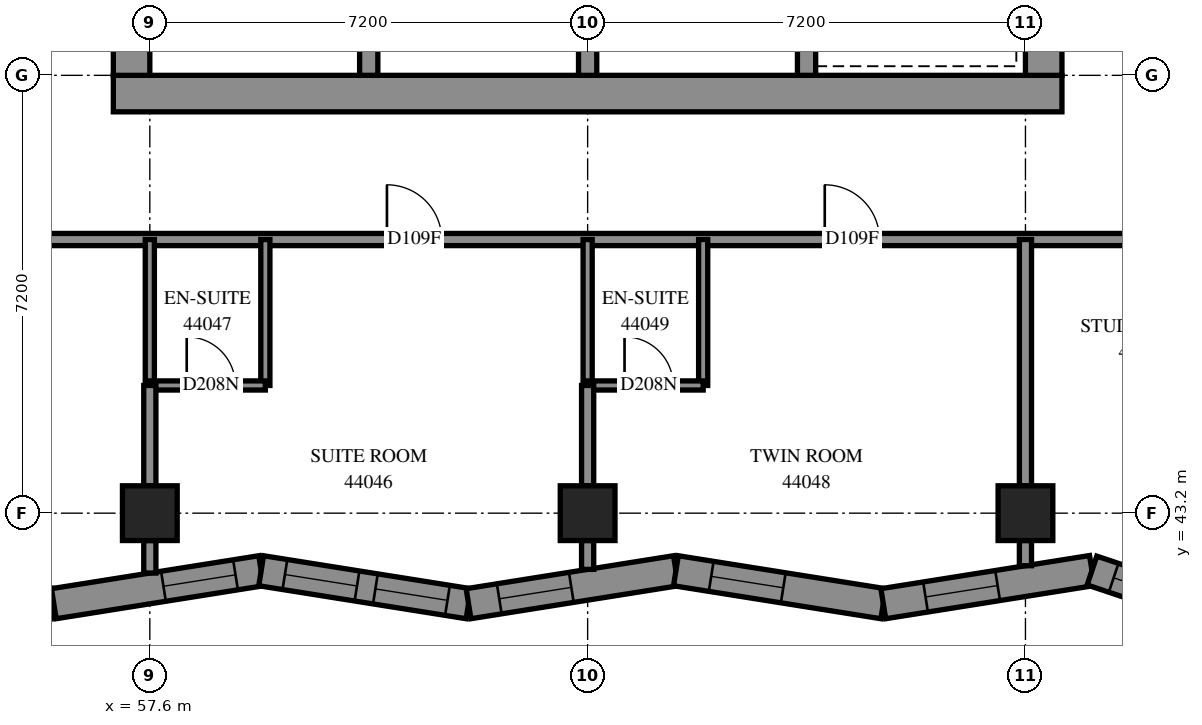
"""IFC4 building model, lengths in metres.
Left out: names, types, materials, properties, quantities, classifications, styles, units other than length and angle.
Written with IfcOpenShell. Run it as: python <this file> out.ifc"""

import sys

from ifc_helpers import new_model, si_unit, direction, frame, frame_2d, origin, origin_2d, place, context, subcontext, project, spatial, polyline, rectangle, outline, extrude, element, fill, save


model = new_model("IFC4")
c1 = context("Model", 3, precision=1e-05, world=origin(), true_north=direction((0.0, 1.0)))
c2 = subcontext(c1, "Body", "Model", "MODEL_VIEW")
j1 = project(units=[si_unit("LENGTHUNIT", "METRE"), si_unit("PLANEANGLEUNIT", "RADIAN")], contexts=[c1])
p1 = place(None, origin())
s1 = spatial("IfcSite", under=j1, at=p1, CompositionType="ELEMENT")
p2 = place(p1, origin())
s2 = spatial("IfcBuilding", under=s1, at=p2, CompositionType="ELEMENT")
p3 = place(p2, frame((0.0, 0.0, 162.6)))
s3 = spatial("IfcBuildingStorey", under=s2, at=p3, CompositionType="ELEMENT", Elevation=162.6)
for number, where, z_axis, x_axis in (
    (1, (57.6, 43.2, 0.0), (0.0, 0.0, 1.0), (1.0, 0.0, 0.0)),
    (2, (64.8, 43.2, 0.0), (0.0, 0.0, 1.0), (1.0, 0.0, 0.0)),
    (3, (72.0, 43.2, 0.0), (0.0, 0.0, 1.0), (1.0, 0.0, 0.0)),
):
    element("IfcColumn", number, at=place(p3, frame(where, z_axis=z_axis, x_axis=x_axis)), inside=s3, PredefinedType="COLUMN", context=c2, shape_type="SweptSolid", body=[
        extrude(rectangle(XDim=0.9, YDim=0.9, at=origin_2d()), origin(), (0.0, 0.0, 1.0), 3.1),
    ])
p4 = place(p3, frame((57.0, 50.1, -0.3), z_axis=(0.0, 0.0, 1.0), x_axis=(1.0, 0.0, 0.0)))
e4 = element("IfcWall", 4, at=p4, inside=s3, PredefinedType="SHEAR", context=c2, shape_type="SweptSolid", body=[
    extrude(rectangle(XDim=15.6, YDim=0.6, at=frame_2d((7.8, 0.0))), origin(), (0.0, 0.0, 1.0), 2.7),
])
p5 = place(p3, frame((57.3, 50.4, -0.3), z_axis=(0.0, 0.0, 1.0), x_axis=(0.0, 1.0, 0.0)))
e5 = element("IfcWall", 5, at=p5, inside=s3, PredefinedType="SHEAR", context=c2, shape_type="SweptSolid", body=[
    extrude(rectangle(XDim=14.4, YDim=0.6, at=frame_2d((7.2, 0.0))), origin(), (0.0, 0.0, 1.0), 2.7),
])
p6 = place(p5, frame((4.55, 0.0, 0.3)))
e6 = element("IfcOpeningElement", 6, at=p6, cuts=e5, PredefinedType="OPENING", context=c2, shape_type="SweptSolid", body=[
    extrude(rectangle(XDim=1.1, YDim=2.1, at=frame_2d((0.55, 1.05))), frame((0.0, 0.31, 0.0), z_axis=(0.0, -1.0, 0.0), x_axis=(1.0, 0.0, 0.0)), (0.0, 0.0, 1.0), 0.62),
])
p7 = place(p5, frame((11.35, 0.0, 0.3)))
e7 = element("IfcOpeningElement", 7, at=p7, cuts=e5, PredefinedType="OPENING", context=c2, shape_type="SweptSolid", body=[
    extrude(rectangle(XDim=1.1, YDim=2.1, at=frame_2d((0.55, 1.05))), frame((0.0, 0.31, 0.0), z_axis=(0.0, -1.0, 0.0), x_axis=(1.0, 0.0, 0.0)), (0.0, 0.0, 1.0), 0.62),
])
p8 = place(p3, frame((72.3, 50.4, -0.3), z_axis=(0.0, 0.0, 1.0), x_axis=(0.0, 1.0, 0.0)))
e8 = element("IfcWall", 8, at=p8, inside=s3, PredefinedType="SHEAR", context=c2, shape_type="SweptSolid", body=[
    extrude(rectangle(XDim=14.4, YDim=0.6, at=frame_2d((7.2, 0.0))), origin(), (0.0, 0.0, 1.0), 2.7),
])
p9 = place(p8, frame((4.55, 0.0, 0.3)))
e9 = element("IfcOpeningElement", 9, at=p9, cuts=e8, PredefinedType="OPENING", context=c2, shape_type="SweptSolid", body=[
    extrude(rectangle(XDim=1.1, YDim=2.1, at=frame_2d((0.55, 1.05))), frame((0.0, 0.31, 0.0), z_axis=(0.0, -1.0, 0.0), x_axis=(1.0, 0.0, 0.0)), (0.0, 0.0, 1.0), 0.62),
])
p10 = place(p8, frame((11.35, 0.0, 0.3)))
e10 = element("IfcOpeningElement", 10, at=p10, cuts=e8, PredefinedType="OPENING", context=c2, shape_type="SweptSolid", body=[
    extrude(rectangle(XDim=1.1, YDim=2.1, at=frame_2d((0.55, 1.05))), frame((0.0, 0.31, 0.0), z_axis=(0.0, -1.0, 0.0), x_axis=(1.0, 0.0, 0.0)), (0.0, 0.0, 1.0), 0.62),
])
for number, where, z_axis, x_axis in (
    (11, (61.2, 50.4, 0.0), (0.0, 0.0, 1.0), (0.0, 1.0, 0.0)),
    (12, (64.8, 50.4, 0.0), (0.0, 0.0, 1.0), (0.0, 1.0, 0.0)),
    (13, (68.4, 50.4, 0.0), (0.0, 0.0, 1.0), (0.0, 1.0, 0.0)),
):
    element("IfcWall", number, at=place(p3, frame(where, z_axis=z_axis, x_axis=x_axis)), inside=s3, PredefinedType="SOLIDWALL", context=c2, shape_type="SweptSolid", body=[
        extrude(rectangle(XDim=3.3, YDim=0.3, at=frame_2d((1.65, 0.0))), origin(), (0.0, 0.0, 1.0), 3.1),
    ])
p11 = place(p3, frame((52.589, 42.257, 0.0), z_axis=(0.0, 0.0, 1.0), x_axis=(0.9876042465, -0.1569644935, 0.0)))
e14 = element("IfcWall", 14, at=p11, inside=s3, PredefinedType="SOLIDWALL", context=c2, shape_type="SweptSolid", body=[
    extrude(outline(polyline([(0.061, -0.25), (3.514, -0.25), (3.435, 0.25), (-0.061, 0.25), (0.061, -0.25)])), origin(), (0.0, 0.0, 1.0), 3.1),
])
p12 = place(p11, frame((1.732, 0.0, 0.45)))
e15 = element("IfcOpeningElement", 15, at=p12, cuts=e14, PredefinedType="OPENING", context=c2, shape_type="SweptSolid", body=[
    extrude(rectangle(XDim=1.2, YDim=2.5, at=frame_2d((0.6, 1.25))), frame((0.0, 0.26, 0.0), z_axis=(0.0, -1.0, 0.0), x_axis=(1.0, 0.0, 0.0)), (0.0, 0.0, 1.0), 0.52),
])
p13 = place(p3, frame((56.021, 41.711, 0.0), z_axis=(0.0, 0.0, 1.0), x_axis=(0.9876056196, 0.1569558544, 0.0)))
e16 = element("IfcWall", 16, at=p13, inside=s3, PredefinedType="SOLIDWALL", context=c2, shape_type="SweptSolid", body=[
    extrude(outline(polyline([(-0.04, -0.25), (3.413, -0.25), (3.493, 0.25), (0.04, 0.25), (-0.04, -0.25)])), origin(), (0.0, 0.0, 1.0), 3.1),
])
p14 = place(p13, frame((1.826, 0.0, 0.45)))
e17 = element("IfcOpeningElement", 17, at=p14, cuts=e16, PredefinedType="OPENING", context=c2, shape_type="SweptSolid", body=[
    extrude(rectangle(XDim=1.2, YDim=2.5, at=frame_2d((0.6, 1.25))), frame((0.0, 0.26, 0.0), z_axis=(0.0, -1.0, 0.0), x_axis=(1.0, 0.0, 0.0)), (0.0, 0.0, 1.0), 0.52),
])
p15 = place(p3, frame((59.431, 42.253, 0.0), z_axis=(0.0, 0.0, 1.0), x_axis=(0.9876049061, -0.1569603434, 0.0)))
e18 = element("IfcWall", 18, at=p15, inside=s3, PredefinedType="SOLIDWALL", context=c2, shape_type="SweptSolid", body=[
    extrude(outline(polyline([(0.04, -0.25), (3.493, -0.25), (3.413, 0.25), (-0.04, 0.25), (0.04, -0.25)])), origin(), (0.0, 0.0, 1.0), 3.1),
])
p16 = place(p15, frame((0.396, 0.0, 0.45)))
e19 = element("IfcOpeningElement", 19, at=p16, cuts=e18, PredefinedType="OPENING", context=c2, shape_type="SweptSolid", body=[
    extrude(rectangle(XDim=1.2, YDim=2.5, at=frame_2d((0.6, 1.25))), frame((0.0, 0.26, 0.0), z_axis=(0.0, -1.0, 0.0), x_axis=(1.0, 0.0, 0.0)), (0.0, 0.0, 1.0), 0.52),
])
p17 = place(p15, frame((1.902, 0.0, 0.45)))
e20 = element("IfcOpeningElement", 20, at=p17, cuts=e18, PredefinedType="OPENING", context=c2, shape_type="SweptSolid", body=[
    extrude(rectangle(XDim=1.2, YDim=2.5, at=frame_2d((0.6, 1.25))), frame((0.0, 0.26, 0.0), z_axis=(0.0, -1.0, 0.0), x_axis=(1.0, 0.0, 0.0)), (0.0, 0.0, 1.0), 0.52),
])
p18 = place(p3, frame((62.841, 41.711, 0.0), z_axis=(0.0, 0.0, 1.0), x_axis=(0.9876056196, 0.1569558544, 0.0)))
e21 = element("IfcWall", 21, at=p18, inside=s3, PredefinedType="SOLIDWALL", context=c2, shape_type="SweptSolid", body=[
    extrude(outline(polyline([(-0.04, -0.25), (3.413, -0.25), (3.493, 0.25), (0.04, 0.25), (-0.04, -0.25)])), origin(), (0.0, 0.0, 1.0), 3.1),
])
p19 = place(p18, frame((0.511, 0.0, 0.45)))
e22 = element("IfcOpeningElement", 22, at=p19, cuts=e21, PredefinedType="OPENING", context=c2, shape_type="SweptSolid", body=[
    extrude(rectangle(XDim=1.2, YDim=2.5, at=frame_2d((0.6, 1.25))), frame((0.0, 0.26, 0.0), z_axis=(0.0, -1.0, 0.0), x_axis=(1.0, 0.0, 0.0)), (0.0, 0.0, 1.0), 0.52),
])
p20 = place(p3, frame((66.252, 42.253, 0.0), z_axis=(0.0, 0.0, 1.0), x_axis=(0.9876056196, -0.1569558544, 0.0)))
e23 = element("IfcWall", 23, at=p20, inside=s3, PredefinedType="SOLIDWALL", context=c2, shape_type="SweptSolid", body=[
    extrude(outline(polyline([(0.04, -0.25), (3.493, -0.25), (3.413, 0.25), (-0.04, 0.25), (0.04, -0.25)])), origin(), (0.0, 0.0, 1.0), 3.1),
])
p21 = place(p20, frame((0.588, 0.0, 0.45)))
e24 = element("IfcOpeningElement", 24, at=p21, cuts=e23, PredefinedType="OPENING", context=c2, shape_type="SweptSolid", body=[
    extrude(rectangle(XDim=1.2, YDim=2.5, at=frame_2d((0.6, 1.25))), frame((0.0, 0.26, 0.0), z_axis=(0.0, -1.0, 0.0), x_axis=(1.0, 0.0, 0.0)), (0.0, 0.0, 1.0), 0.52),
])
p22 = place(p3, frame((69.662, 41.711, 0.0), z_axis=(0.0, 0.0, 1.0), x_axis=(0.9876042465, 0.1569644935, 0.0)))
e25 = element("IfcWall", 25, at=p22, inside=s3, PredefinedType="SOLIDWALL", context=c2, shape_type="SweptSolid", body=[
    extrude(outline(polyline([(-0.04, -0.25), (3.413, -0.25), (3.536, 0.25), (0.04, 0.25), (-0.04, -0.25)])), origin(), (0.0, 0.0, 1.0), 3.1),
])
p23 = place(p22, frame((0.704, 0.0, 0.45)))
e26 = element("IfcOpeningElement", 26, at=p23, cuts=e25, PredefinedType="OPENING", context=c2, shape_type="SweptSolid", body=[
    extrude(rectangle(XDim=1.2, YDim=2.5, at=frame_2d((0.6, 1.25))), frame((0.0, 0.26, 0.0), z_axis=(0.0, -1.0, 0.0), x_axis=(1.0, 0.0, 0.0)), (0.0, 0.0, 1.0), 0.52),
])
p24 = place(p3, frame((73.094, 42.257, 0.0), z_axis=(0.0, 0.0, 1.0), x_axis=(0.9482477624, -0.3175313861, 0.0)))
e27 = element("IfcWall", 27, at=p24, inside=s3, PredefinedType="SOLIDWALL", context=c2, shape_type="SweptSolid", body=[
    extrude(outline(polyline([(0.061, -0.25), (3.658, -0.25), (3.705, 0.25), (-0.061, 0.25), (0.061, -0.25)])), origin(), (0.0, 0.0, 1.0), 3.1),
])
p25 = place(p24, frame((0.376, 0.0, 0.45)))
e28 = element("IfcOpeningElement", 28, at=p25, cuts=e27, PredefinedType="OPENING", context=c2, shape_type="SweptSolid", body=[
    extrude(rectangle(XDim=1.0, YDim=2.5, at=frame_2d((0.5, 1.25))), frame((0.0, 0.26, 0.0), z_axis=(0.0, -1.0, 0.0), x_axis=(1.0, 0.0, 0.0)), (0.0, 0.0, 1.0), 0.52),
])
p26 = place(p24, frame((1.967, 0.0, 0.5)))
e29 = element("IfcOpeningElement", 29, at=p26, cuts=e27, PredefinedType="OPENING", context=c2, shape_type="SweptSolid", body=[
    extrude(rectangle(XDim=1.2, YDim=2.45, at=frame_2d((0.6, 1.225))), frame((0.0, 0.26, 0.0), z_axis=(0.0, -1.0, 0.0), x_axis=(1.0, 0.0, 0.0)), (0.0, 0.0, 1.0), 0.52),
])
p27 = place(p3, frame((54.9, 47.7, 0.0), z_axis=(0.0, 0.0, 1.0), x_axis=(1.0, 0.0, 0.0)))
e30 = element("IfcWall", 30, at=p27, inside=s3, PredefinedType="PARTITIONING", context=c2, shape_type="SweptSolid", body=[
    extrude(rectangle(XDim=19.326, YDim=0.2, at=frame_2d((9.663, 0.0))), origin(), (0.0, 0.0, 1.0), 3.1),
])
p28 = place(p27, frame((6.599, 0.0, 0.0)))
e31 = element("IfcOpeningElement", 31, at=p28, cuts=e30, PredefinedType="OPENING", context=c2, shape_type="SweptSolid", body=[
    extrude(rectangle(XDim=0.9, YDim=2.1, at=frame_2d((0.45, 1.05))), frame((0.0, 0.11, 0.0), z_axis=(0.0, -1.0, 0.0), x_axis=(1.0, 0.0, 0.0)), (0.0, 0.0, 1.0), 0.22),
])
p29 = place(p27, frame((13.799, 0.0, 0.0)))
e32 = element("IfcOpeningElement", 32, at=p29, cuts=e30, PredefinedType="OPENING", context=c2, shape_type="SweptSolid", body=[
    extrude(rectangle(XDim=0.9, YDim=2.1, at=frame_2d((0.45, 1.05))), frame((0.0, 0.11, 0.0), z_axis=(0.0, -1.0, 0.0), x_axis=(1.0, 0.0, 0.0)), (0.0, 0.0, 1.0), 0.22),
])
p30 = place(p3, frame((72.0, 43.65, 0.0), z_axis=(0.0, 0.0, 1.0), x_axis=(0.0, 1.0, 0.0)))
e33 = element("IfcWall", 33, at=p30, inside=s3, PredefinedType="PARTITIONING", context=c2, shape_type="SweptSolid", body=[
    extrude(rectangle(XDim=4.05, YDim=0.2, at=frame_2d((2.025, 0.0))), origin(), (0.0, 0.0, 1.0), 3.1),
])
for number, where, z_axis, x_axis in (
    (34, (59.5, 45.3, 0.0), (0.0, 0.0, 1.0), (0.0, 1.0, 0.0)),
    (35, (57.6, 45.3, 0.0), (0.0, 0.0, 1.0), (0.0, 1.0, 0.0)),
    (36, (66.7, 45.3, 0.0), (0.0, 0.0, 1.0), (0.0, 1.0, 0.0)),
    (37, (64.8, 45.3, 0.0), (0.0, 0.0, 1.0), (0.0, 1.0, 0.0)),
):
    element("IfcWall", number, at=place(p3, frame(where, z_axis=z_axis, x_axis=x_axis)), inside=s3, PredefinedType="PARTITIONING", context=c2, shape_type="SweptSolid", body=[
        extrude(rectangle(XDim=2.4, YDim=0.15, at=frame_2d((1.2, 0.0))), origin(), (0.0, 0.0, 1.0), 3.1),
    ])
p31 = place(p3, frame((64.8, 45.3, 0.0), z_axis=(0.0, 0.0, 1.0), x_axis=(1.0, 0.0, 0.0)))
e38 = element("IfcWall", 38, at=p31, inside=s3, PredefinedType="PARTITIONING", context=c2, shape_type="SweptSolid", body=[
    extrude(rectangle(XDim=1.9, YDim=0.15, at=frame_2d((0.95, 0.0))), origin(), (0.0, 0.0, 1.0), 3.1),
])
p32 = place(p31, frame((0.607, 0.0, 0.0)))
e39 = element("IfcOpeningElement", 39, at=p32, cuts=e38, PredefinedType="OPENING", context=c2, shape_type="SweptSolid", body=[
    extrude(rectangle(XDim=0.8, YDim=2.1, at=frame_2d((0.4, 1.05))), frame((0.0, 0.085, 0.0), z_axis=(0.0, -1.0, 0.0), x_axis=(1.0, 0.0, 0.0)), (0.0, 0.0, 1.0), 0.17),
])
p33 = place(p3, frame((57.6, 45.3, 0.0), z_axis=(0.0, 0.0, 1.0), x_axis=(1.0, 0.0, 0.0)))
e40 = element("IfcWall", 40, at=p33, inside=s3, PredefinedType="PARTITIONING", context=c2, shape_type="SweptSolid", body=[
    extrude(rectangle(XDim=1.9, YDim=0.15, at=frame_2d((0.95, 0.0))), origin(), (0.0, 0.0, 1.0), 3.1),
])
p34 = place(p33, frame((0.607, 0.0, 0.0)))
e41 = element("IfcOpeningElement", 41, at=p34, cuts=e40, PredefinedType="OPENING", context=c2, shape_type="SweptSolid", body=[
    extrude(rectangle(XDim=0.8, YDim=2.1, at=frame_2d((0.4, 1.05))), frame((0.0, 0.085, 0.0), z_axis=(0.0, -1.0, 0.0), x_axis=(1.0, 0.0, 0.0)), (0.0, 0.0, 1.0), 0.17),
])
for number, where, z_axis, x_axis in (
    (42, (57.6, 43.65, 0.0), (0.0, 0.0, 1.0), (0.0, 1.0, 0.0)),
    (43, (64.8, 43.65, 0.0), (0.0, 0.0, 1.0), (0.0, 1.0, 0.0)),
):
    element("IfcWall", number, at=place(p3, frame(where, z_axis=z_axis, x_axis=x_axis)), inside=s3, PredefinedType="PARTITIONING", context=c2, shape_type="SweptSolid", body=[
        extrude(rectangle(XDim=1.65, YDim=0.2, at=frame_2d((0.825, 0.0))), origin(), (0.0, 0.0, 1.0), 3.1),
    ])
p35 = place(p3, frame((57.6, 42.215, 0.0), z_axis=(0.0, 0.0, 1.0), x_axis=(0.0, 1.0, 0.0)))
e44 = element("IfcWall", 44, at=p35, inside=s3, PredefinedType="PARTITIONING", context=c2, shape_type="SweptSolid", body=[
    extrude(rectangle(XDim=0.535, YDim=0.2, at=frame_2d((0.267, 0.0))), origin(), (0.0, 0.0, 1.0), 3.1),
])
p36 = place(p3, frame((64.8, 42.276, 0.0), z_axis=(0.0, 0.0, 1.0), x_axis=(0.0, 1.0, 0.0)))
e45 = element("IfcWall", 45, at=p36, inside=s3, PredefinedType="PARTITIONING", context=c2, shape_type="SweptSolid", body=[
    extrude(rectangle(XDim=0.474, YDim=0.2, at=frame_2d((0.237, 0.0))), origin(), (0.0, 0.0, 1.0), 3.1),
])
p37 = place(p3, frame((72.0, 42.336, 0.0), z_axis=(0.0, 0.0, 1.0), x_axis=(0.0, 1.0, 0.0)))
e46 = element("IfcWall", 46, at=p37, inside=s3, PredefinedType="PARTITIONING", context=c2, shape_type="SweptSolid", body=[
    extrude(rectangle(XDim=0.414, YDim=0.2, at=frame_2d((0.207, 0.0))), origin(), (0.0, 0.0, 1.0), 3.1),
])
p38 = place(p14, origin())
e47 = element("IfcWindow", 47, at=p38, inside=s3, PartitioningType="SINGLE_PANEL", PredefinedType="WINDOW", context=c2, shape_type="SweptSolid", body=[
    extrude(rectangle(XDim=1.2, YDim=2.5, at=frame_2d((0.6, 1.25))), frame((0.0, 0.18, 0.0), z_axis=(0.0, -1.0, 0.0), x_axis=(1.0, 0.0, 0.0)), (0.0, 0.0, 1.0), 0.06),
])
fill(e17, e47)
p39 = place(p16, origin())
e48 = element("IfcWindow", 48, at=p39, inside=s3, PartitioningType="SINGLE_PANEL", PredefinedType="WINDOW", context=c2, shape_type="SweptSolid", body=[
    extrude(rectangle(XDim=1.2, YDim=2.5, at=frame_2d((0.6, 1.25))), frame((0.0, 0.18, 0.0), z_axis=(0.0, -1.0, 0.0), x_axis=(1.0, 0.0, 0.0)), (0.0, 0.0, 1.0), 0.06),
])
fill(e19, e48)
p40 = place(p17, origin())
e49 = element("IfcWindow", 49, at=p40, inside=s3, PartitioningType="SINGLE_PANEL", PredefinedType="WINDOW", context=c2, shape_type="SweptSolid", body=[
    extrude(rectangle(XDim=1.2, YDim=2.5, at=frame_2d((0.6, 1.25))), frame((0.0, 0.18, 0.0), z_axis=(0.0, -1.0, 0.0), x_axis=(1.0, 0.0, 0.0)), (0.0, 0.0, 1.0), 0.06),
])
fill(e20, e49)
p41 = place(p19, origin())
e50 = element("IfcWindow", 50, at=p41, inside=s3, PartitioningType="SINGLE_PANEL", PredefinedType="WINDOW", context=c2, shape_type="SweptSolid", body=[
    extrude(rectangle(XDim=1.2, YDim=2.5, at=frame_2d((0.6, 1.25))), frame((0.0, 0.18, 0.0), z_axis=(0.0, -1.0, 0.0), x_axis=(1.0, 0.0, 0.0)), (0.0, 0.0, 1.0), 0.06),
])
fill(e22, e50)
p42 = place(p21, origin())
e51 = element("IfcWindow", 51, at=p42, inside=s3, PartitioningType="SINGLE_PANEL", PredefinedType="WINDOW", context=c2, shape_type="SweptSolid", body=[
    extrude(rectangle(XDim=1.2, YDim=2.5, at=frame_2d((0.6, 1.25))), frame((0.0, 0.18, 0.0), z_axis=(0.0, -1.0, 0.0), x_axis=(1.0, 0.0, 0.0)), (0.0, 0.0, 1.0), 0.06),
])
fill(e24, e51)
p43 = place(p23, origin())
e52 = element("IfcWindow", 52, at=p43, inside=s3, PartitioningType="SINGLE_PANEL", PredefinedType="WINDOW", context=c2, shape_type="SweptSolid", body=[
    extrude(rectangle(XDim=1.2, YDim=2.5, at=frame_2d((0.6, 1.25))), frame((0.0, 0.18, 0.0), z_axis=(0.0, -1.0, 0.0), x_axis=(1.0, 0.0, 0.0)), (0.0, 0.0, 1.0), 0.06),
])
fill(e26, e52)
p44 = place(p28, origin())
e53 = element("IfcDoor", 53, at=p44, inside=s3, OperationType="SINGLE_SWING_LEFT", PredefinedType="DOOR", context=c2, shape_type="SweptSolid", body=[
    extrude(rectangle(XDim=0.9, YDim=2.1, at=frame_2d((0.45, 1.05))), frame((0.0, 0.025, 0.0), z_axis=(0.0, -1.0, 0.0), x_axis=(1.0, 0.0, 0.0)), (0.0, 0.0, 1.0), 0.05),
])
fill(e31, e53)
p45 = place(p34, origin())
e54 = element("IfcDoor", 54, at=p45, inside=s3, OperationType="SINGLE_SWING_RIGHT", PredefinedType="DOOR", context=c2, shape_type="SweptSolid", body=[
    extrude(rectangle(XDim=0.8, YDim=2.1, at=frame_2d((0.4, 1.05))), frame((0.0, 0.025, 0.0), z_axis=(0.0, -1.0, 0.0), x_axis=(1.0, 0.0, 0.0)), (0.0, 0.0, 1.0), 0.05),
])
fill(e41, e54)
p46 = place(p29, origin())
e55 = element("IfcDoor", 55, at=p46, inside=s3, OperationType="SINGLE_SWING_LEFT", PredefinedType="DOOR", context=c2, shape_type="SweptSolid", body=[
    extrude(rectangle(XDim=0.9, YDim=2.1, at=frame_2d((0.45, 1.05))), frame((0.0, 0.025, 0.0), z_axis=(0.0, -1.0, 0.0), x_axis=(1.0, 0.0, 0.0)), (0.0, 0.0, 1.0), 0.05),
])
fill(e32, e55)
p47 = place(p32, origin())
e56 = element("IfcDoor", 56, at=p47, inside=s3, OperationType="SINGLE_SWING_RIGHT", PredefinedType="DOOR", context=c2, shape_type="SweptSolid", body=[
    extrude(rectangle(XDim=0.8, YDim=2.1, at=frame_2d((0.4, 1.05))), frame((0.0, 0.025, 0.0), z_axis=(0.0, -1.0, 0.0), x_axis=(1.0, 0.0, 0.0)), (0.0, 0.0, 1.0), 0.05),
])
fill(e39, e56)
p48 = place(p25, origin())
e57 = element("IfcWindow", 57, at=p48, inside=s3, PartitioningType="SINGLE_PANEL", PredefinedType="WINDOW", context=c2, shape_type="SweptSolid", body=[
    extrude(rectangle(XDim=1.0, YDim=2.5, at=frame_2d((0.5, 1.25))), frame((0.0, 0.18, 0.0), z_axis=(0.0, -1.0, 0.0), x_axis=(1.0, 0.0, 0.0)), (0.0, 0.0, 1.0), 0.06),
])
fill(e28, e57)
save(model, sys.argv[1])
